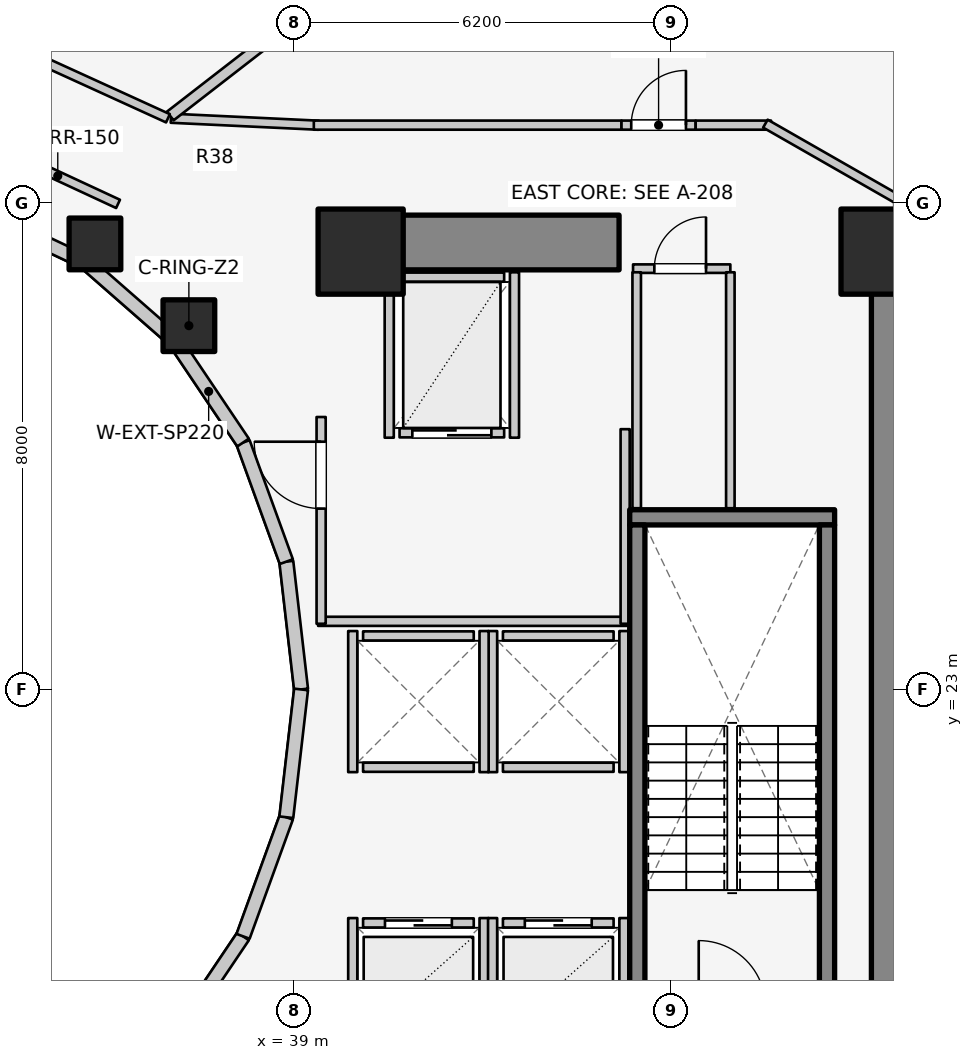
"""IFC4 building model, lengths in metres.
Left out: names, types, materials, properties, quantities, classifications, styles, units other than length and angle.
Written with IfcOpenShell. Run it as: python <this file> out.ifc"""

import sys

from ifc_helpers import new_model, si_unit, direction, frame, frame_2d, origin, origin_2d, place, context, subcontext, project, spatial, rectangle, extrude, element, fill, save


model = new_model("IFC4")
c1 = context("Model", 3, precision=1e-05, world=origin(), true_north=direction((0.0, 1.0)))
c2 = subcontext(c1, "Body", "Model", "MODEL_VIEW")
j1 = project(units=[si_unit("LENGTHUNIT", "METRE"), si_unit("PLANEANGLEUNIT", "RADIAN")], contexts=[c1])
p1 = place(None, origin())
s1 = spatial("IfcSite", under=j1, at=p1, CompositionType="ELEMENT")
p2 = place(p1, origin())
s2 = spatial("IfcBuilding", under=s1, at=p2, CompositionType="ELEMENT")
p3 = place(p2, frame((0.0, 0.0, 82.5)))
s3 = spatial("IfcBuildingStorey", under=s2, at=p3, CompositionType="ELEMENT", Elevation=82.5)
p4 = place(p3, frame((48.95, 17.05, 0.0), z_axis=(0.0, 0.0, 1.0), x_axis=(0.0, 1.0, 0.0)))
e1 = element("IfcWall", 1, at=p4, inside=s3, PredefinedType="SHEAR", context=c2, shape_type="SweptSolid", body=[
    extrude(rectangle(XDim=12.8, YDim=0.9, at=frame_2d((6.4, 0.0))), origin(), (0.0, 0.0, 1.0), 3.1),
])
p5 = place(p3, frame((39.85, 30.35, 0.0), z_axis=(0.0, 0.0, 1.0), x_axis=(1.0, 0.0, 0.0)))
e2 = element("IfcWall", 2, at=p5, inside=s3, PredefinedType="SHEAR", context=c2, shape_type="SweptSolid", body=[
    extrude(rectangle(XDim=4.5, YDim=0.9, at=frame_2d((2.25, 0.0))), origin(), (0.0, 0.0, 1.0), 3.1),
])
p6 = place(p3, frame((44.525, 25.83, 0.0), z_axis=(0.0, 0.0, 1.0), x_axis=(1.0, 0.0, 0.0)))
e3 = element("IfcWall", 3, at=p6, inside=s3, PredefinedType="SOLIDWALL", context=c2, shape_type="SweptSolid", body=[
    extrude(rectangle(XDim=3.37, YDim=0.25, at=frame_2d((1.685, 0.0))), origin(), (0.0, 0.0, 1.0), 3.1),
])
for number, where, z_axis, x_axis in (
    (4, (44.65, 17.895, 0.0), (0.0, 0.0, 1.0), (0.0, 1.0, 0.0)),
    (5, (47.77, 17.895, 0.0), (0.0, 0.0, 1.0), (0.0, 1.0, 0.0)),
):
    element("IfcWall", number, at=place(p3, frame(where, z_axis=z_axis, x_axis=x_axis)), inside=s3, PredefinedType="SOLIDWALL", context=c2, shape_type="SweptSolid", body=[
        extrude(rectangle(XDim=7.81, YDim=0.25, at=frame_2d((3.905, 0.0))), origin(), (0.0, 0.0, 1.0), 3.1),
    ])
for number, where, z_axis, x_axis in (
    (6, (48.7, 30.2, 0.0), (0.0, 0.0, 1.0), (1.0, 0.0, 0.0)),
    (7, (40.1, 30.2, 0.0), (0.0, 0.0, 1.0), (1.0, 0.0, 0.0)),
):
    element("IfcColumn", number, at=place(p3, frame(where, z_axis=z_axis, x_axis=x_axis)), inside=s3, PredefinedType="COLUMN", context=c2, shape_type="SweptSolid", body=[
        extrude(rectangle(XDim=1.4, YDim=1.4, at=origin_2d()), origin(), (0.0, 0.0, 1.0), 3.1),
    ])
for number, where, z_axis, x_axis in (
    (8, (37.275, 28.982, 0.0), (0.0, 0.0, 1.0), (1.0, 0.0, 0.0)),
    (9, (35.73, 30.327, 0.0), (0.0, 0.0, 1.0), (1.0, 0.0, 0.0)),
):
    element("IfcColumn", number, at=place(p3, frame(where, z_axis=z_axis, x_axis=x_axis)), inside=s3, PredefinedType="COLUMN", context=c2, shape_type="SweptSolid", body=[
        extrude(rectangle(XDim=0.85, YDim=0.85, at=origin_2d()), origin(), (0.0, 0.0, 1.0), 3.1),
    ])
p7 = place(p3, frame((39.12, 23.0, 0.0), z_axis=(0.0, 0.0, 1.0), x_axis=(-0.114711713601, 0.993398823617, 0.0)))
e10 = element("IfcWall", 10, at=p7, inside=s3, PredefinedType="STANDARD", context=c2, shape_type="SweptSolid", body=[
    extrude(rectangle(XDim=2.115, YDim=0.23, at=frame_2d((1.058, 0.0))), origin(), (0.0, 0.0, 1.0), 2.56),
])
p8 = place(p3, frame((38.877, 25.102, 0.0), z_axis=(0.0, 0.0, 1.0), x_axis=(-0.341423187295, 0.93990968033, 0.0)))
e11 = element("IfcWall", 11, at=p8, inside=s3, PredefinedType="STANDARD", context=c2, shape_type="SweptSolid", body=[
    extrude(rectangle(XDim=2.084, YDim=0.23, at=frame_2d((1.042, 0.0))), origin(), (0.0, 0.0, 1.0), 2.56),
])
p9 = place(p3, frame((38.166, 27.06, 0.0), z_axis=(0.0, 0.0, 1.0), x_axis=(-0.558197800898, 0.829707909492, 0.0)))
e12 = element("IfcWall", 12, at=p9, inside=s3, PredefinedType="STANDARD", context=c2, shape_type="SweptSolid", body=[
    extrude(rectangle(XDim=2.027, YDim=0.23, at=frame_2d((1.013, 0.0))), origin(), (0.0, 0.0, 1.0), 1.22),
])
p10 = place(p3, frame((37.035, 28.742, 0.0), z_axis=(0.0, 0.0, 1.0), x_axis=(-0.752576694707, 0.658504607869, 0.0)))
e13 = element("IfcWall", 13, at=p10, inside=s3, PredefinedType="STANDARD", context=c2, shape_type="SweptSolid", body=[
    extrude(rectangle(XDim=1.959, YDim=0.23, at=frame_2d((0.98, 0.0))), origin(), (0.0, 0.0, 1.0), 1.22),
])
p11 = place(p3, frame((35.56, 30.032, 0.0), z_axis=(0.0, 0.0, 1.0), x_axis=(-0.904179699603, 0.427152280606, 0.0)))
e14 = element("IfcWall", 14, at=p11, inside=s3, PredefinedType="STANDARD", context=c2, shape_type="SweptSolid", body=[
    extrude(rectangle(XDim=1.899, YDim=0.23, at=frame_2d((0.95, 0.0))), origin(), (0.0, 0.0, 1.0), 1.22),
])
p12 = place(p3, frame((37.035, 17.258, 0.0), z_axis=(0.0, 0.0, 1.0), x_axis=(0.558197800898, 0.829707909492, 0.0)))
e15 = element("IfcWall", 15, at=p12, inside=s3, PredefinedType="STANDARD", context=c2, shape_type="SweptSolid", body=[
    extrude(rectangle(XDim=2.027, YDim=0.23, at=frame_2d((1.013, 0.0))), origin(), (0.0, 0.0, 1.0), 1.22),
])
p13 = place(p3, frame((38.166, 18.94, 0.0), z_axis=(0.0, 0.0, 1.0), x_axis=(0.341423187295, 0.93990968033, 0.0)))
e16 = element("IfcWall", 16, at=p13, inside=s3, PredefinedType="STANDARD", context=c2, shape_type="SweptSolid", body=[
    extrude(rectangle(XDim=2.084, YDim=0.23, at=frame_2d((1.042, 0.0))), origin(), (0.0, 0.0, 1.0), 2.56),
])
p14 = place(p3, frame((38.877, 20.898, 0.0), z_axis=(0.0, 0.0, 1.0), x_axis=(0.114711713601, 0.993398823617, 0.0)))
e17 = element("IfcWall", 17, at=p14, inside=s3, PredefinedType="STANDARD", context=c2, shape_type="SweptSolid", body=[
    extrude(rectangle(XDim=2.115, YDim=0.23, at=frame_2d((1.058, 0.0))), origin(), (0.0, 0.0, 1.0), 2.56),
])
p15 = place(p3, frame((40.14, 19.16, 0.0), z_axis=(0.0, 0.0, 1.0), x_axis=(1.0, 0.0, 0.0)))
e18 = element("IfcWall", 18, at=p15, inside=s3, PredefinedType="SOLIDWALL", context=c2, shape_type="SweptSolid", body=[
    extrude(rectangle(XDim=1.82, YDim=0.15, at=frame_2d((0.91, 0.0))), origin(), (0.0, 0.0, 1.0), 2.12),
])
p16 = place(p15, frame((0.36, 0.0, 0.0)))
e19 = element("IfcOpeningElement", 19, at=p16, cuts=e18, PredefinedType="OPENING", context=c2, shape_type="SweptSolid", body=[
    extrude(rectangle(XDim=1.1, YDim=2.1, at=frame_2d((0.55, 1.05))), frame((0.0, 0.085, 0.0), z_axis=(0.0, -1.0, 0.0), x_axis=(1.0, 0.0, 0.0)), (0.0, 0.0, 1.0), 0.17),
])
p17 = place(p3, frame((39.97, 17.02, 0.0), z_axis=(0.0, 0.0, 1.0), x_axis=(0.0, 1.0, 0.0)))
e20 = element("IfcWall", 20, at=p17, inside=s3, PredefinedType="SOLIDWALL", context=c2, shape_type="SweptSolid", body=[
    extrude(rectangle(XDim=2.22, YDim=0.15, at=frame_2d((1.11, 0.0))), origin(), (0.0, 0.0, 1.0), 1.873),
])
p18 = place(p3, frame((42.13, 17.02, 0.0), z_axis=(0.0, 0.0, 1.0), x_axis=(0.0, 1.0, 0.0)))
e21 = element("IfcWall", 21, at=p18, inside=s3, PredefinedType="SOLIDWALL", context=c2, shape_type="SweptSolid", body=[
    extrude(rectangle(XDim=2.22, YDim=0.15, at=frame_2d((1.11, 0.0))), origin(), (0.0, 0.0, 1.0), 2.575),
])
p19 = place(p3, frame((42.44, 19.16, 0.0), z_axis=(0.0, 0.0, 1.0), x_axis=(1.0, 0.0, 0.0)))
e22 = element("IfcWall", 22, at=p19, inside=s3, PredefinedType="SOLIDWALL", context=c2, shape_type="SweptSolid", body=[
    extrude(rectangle(XDim=1.82, YDim=0.15, at=frame_2d((0.91, 0.0))), origin(), (0.0, 0.0, 1.0), 2.575),
])
p20 = place(p19, frame((0.36, 0.0, 0.0)))
e23 = element("IfcOpeningElement", 23, at=p20, cuts=e22, PredefinedType="OPENING", context=c2, shape_type="SweptSolid", body=[
    extrude(rectangle(XDim=1.1, YDim=2.1, at=frame_2d((0.55, 1.05))), frame((0.0, 0.085, 0.0), z_axis=(0.0, -1.0, 0.0), x_axis=(1.0, 0.0, 0.0)), (0.0, 0.0, 1.0), 0.17),
])
p21 = place(p3, frame((42.27, 17.02, 0.0), z_axis=(0.0, 0.0, 1.0), x_axis=(0.0, 1.0, 0.0)))
e24 = element("IfcWall", 24, at=p21, inside=s3, PredefinedType="SOLIDWALL", context=c2, shape_type="SweptSolid", body=[
    extrude(rectangle(XDim=2.22, YDim=0.15, at=frame_2d((1.11, 0.0))), origin(), (0.0, 0.0, 1.0), 2.575),
])
p22 = place(p3, frame((44.43, 17.02, 0.0), z_axis=(0.0, 0.0, 1.0), x_axis=(0.0, 1.0, 0.0)))
e25 = element("IfcWall", 25, at=p22, inside=s3, PredefinedType="SOLIDWALL", context=c2, shape_type="SweptSolid", body=[
    extrude(rectangle(XDim=2.22, YDim=0.15, at=frame_2d((1.11, 0.0))), origin(), (0.0, 0.0, 1.0), 2.12),
])
for number, where, z_axis, x_axis in (
    (26, (42.44, 21.72, 0.0), (0.0, 0.0, 1.0), (1.0, 0.0, 0.0)),
    (27, (42.44, 23.88, 0.0), (0.0, 0.0, 1.0), (1.0, 0.0, 0.0)),
):
    element("IfcWall", number, at=place(p3, frame(where, z_axis=z_axis, x_axis=x_axis)), inside=s3, PredefinedType="SOLIDWALL", context=c2, shape_type="SweptSolid", body=[
        extrude(rectangle(XDim=1.82, YDim=0.15, at=frame_2d((0.91, 0.0))), origin(), (0.0, 0.0, 1.0), 2.575),
    ])
for number, where, z_axis, x_axis in (
    (28, (42.27, 21.64, 0.0), (0.0, 0.0, 1.0), (0.0, 1.0, 0.0)),
    (29, (44.43, 21.64, 0.0), (0.0, 0.0, 1.0), (0.0, 1.0, 0.0)),
):
    element("IfcWall", number, at=place(p3, frame(where, z_axis=z_axis, x_axis=x_axis)), inside=s3, PredefinedType="SOLIDWALL", context=c2, shape_type="SweptSolid", body=[
        extrude(rectangle(XDim=2.32, YDim=0.15, at=frame_2d((1.16, 0.0))), origin(), (0.0, 0.0, 1.0), 2.575),
    ])
for number, where, z_axis, x_axis in (
    (30, (40.14, 21.72, 0.0), (0.0, 0.0, 1.0), (1.0, 0.0, 0.0)),
    (31, (40.14, 23.88, 0.0), (0.0, 0.0, 1.0), (1.0, 0.0, 0.0)),
):
    element("IfcWall", number, at=place(p3, frame(where, z_axis=z_axis, x_axis=x_axis)), inside=s3, PredefinedType="SOLIDWALL", context=c2, shape_type="SweptSolid", body=[
        extrude(rectangle(XDim=1.82, YDim=0.15, at=frame_2d((0.91, 0.0))), origin(), (0.0, 0.0, 1.0), 2.12),
    ])
p23 = place(p3, frame((39.97, 21.64, 0.0), z_axis=(0.0, 0.0, 1.0), x_axis=(0.0, 1.0, 0.0)))
e32 = element("IfcWall", 32, at=p23, inside=s3, PredefinedType="SOLIDWALL", context=c2, shape_type="SweptSolid", body=[
    extrude(rectangle(XDim=2.32, YDim=0.15, at=frame_2d((1.16, 0.0))), origin(), (0.0, 0.0, 1.0), 2.12),
])
p24 = place(p3, frame((42.13, 21.64, 0.0), z_axis=(0.0, 0.0, 1.0), x_axis=(0.0, 1.0, 0.0)))
e33 = element("IfcWall", 33, at=p24, inside=s3, PredefinedType="SOLIDWALL", context=c2, shape_type="SweptSolid", body=[
    extrude(rectangle(XDim=2.32, YDim=0.15, at=frame_2d((1.16, 0.0))), origin(), (0.0, 0.0, 1.0), 2.575),
])
p25 = place(p3, frame((40.74, 27.22, 0.0), z_axis=(0.0, 0.0, 1.0), x_axis=(1.0, 0.0, 0.0)))
e34 = element("IfcWall", 34, at=p25, inside=s3, PredefinedType="SOLIDWALL", context=c2, shape_type="SweptSolid", body=[
    extrude(rectangle(XDim=1.72, YDim=0.15, at=frame_2d((0.86, 0.0))), origin(), (0.0, 0.0, 1.0), 2.575),
])
p26 = place(p25, frame((0.21, 0.0, 0.0)))
e35 = element("IfcOpeningElement", 35, at=p26, cuts=e34, PredefinedType="OPENING", context=c2, shape_type="SweptSolid", body=[
    extrude(rectangle(XDim=1.3, YDim=2.1, at=frame_2d((0.65, 1.05))), frame((0.0, 0.085, 0.0), z_axis=(0.0, -1.0, 0.0), x_axis=(1.0, 0.0, 0.0)), (0.0, 0.0, 1.0), 0.17),
])
p27 = place(p3, frame((40.74, 29.78, 0.0), z_axis=(0.0, 0.0, 1.0), x_axis=(1.0, 0.0, 0.0)))
e36 = element("IfcWall", 36, at=p27, inside=s3, PredefinedType="SOLIDWALL", context=c2, shape_type="SweptSolid", body=[
    extrude(rectangle(XDim=1.72, YDim=0.15, at=frame_2d((0.86, 0.0))), origin(), (0.0, 0.0, 1.0), 2.575),
])
for number, where, z_axis, x_axis in (
    (37, (40.57, 27.14, 0.0), (0.0, 0.0, 1.0), (0.0, 1.0, 0.0)),
    (38, (42.63, 27.14, 0.0), (0.0, 0.0, 1.0), (0.0, 1.0, 0.0)),
):
    element("IfcWall", number, at=place(p3, frame(where, z_axis=z_axis, x_axis=x_axis)), inside=s3, PredefinedType="SOLIDWALL", context=c2, shape_type="SweptSolid", body=[
        extrude(rectangle(XDim=2.72, YDim=0.15, at=frame_2d((1.36, 0.0))), origin(), (0.0, 0.0, 1.0), 2.575),
    ])
p28 = place(p3, frame((39.4, 24.12, 0.0), z_axis=(0.0, 0.0, 1.0), x_axis=(1.0, 0.0, 0.0)))
e39 = element("IfcWall", 39, at=p28, inside=s3, PredefinedType="PARTITIONING", context=c2, shape_type="SweptSolid", body=[
    extrude(rectangle(XDim=5.08, YDim=0.15, at=frame_2d((2.54, 0.0))), origin(), (0.0, 0.0, 1.0), 2.12),
])
p29 = place(p3, frame((44.45, 24.08, 0.0), z_axis=(0.0, 0.0, 1.0), x_axis=(0.0, 1.0, 0.0)))
e40 = element("IfcWall", 40, at=p29, inside=s3, PredefinedType="PARTITIONING", context=c2, shape_type="SweptSolid", body=[
    extrude(rectangle(XDim=3.2, YDim=0.15, at=frame_2d((1.6, 0.0))), origin(), (0.0, 0.0, 1.0), 2.575),
])
p30 = place(p3, frame((39.45, 24.08, 0.0), z_axis=(0.0, 0.0, 1.0), x_axis=(0.0, 1.0, 0.0)))
e41 = element("IfcWall", 41, at=p30, inside=s3, PredefinedType="PARTITIONING", context=c2, shape_type="SweptSolid", body=[
    extrude(rectangle(XDim=3.4, YDim=0.15, at=frame_2d((1.7, 0.0))), origin(), (0.0, 0.0, 1.0), 2.575),
])
p31 = place(p30, frame((1.894, 0.0, 0.0)))
e42 = element("IfcOpeningElement", 42, at=p31, cuts=e41, PredefinedType="OPENING", context=c2, shape_type="SweptSolid", body=[
    extrude(rectangle(XDim=1.1, YDim=2.1, at=frame_2d((0.55, 1.05))), frame((0.0, 0.085, 0.0), z_axis=(0.0, -1.0, 0.0), x_axis=(1.0, 0.0, 0.0)), (0.0, 0.0, 1.0), 0.17),
])
p32 = place(p3, frame((44.58, 29.92, 0.0), z_axis=(0.0, 0.0, 1.0), x_axis=(1.0, 0.0, 0.0)))
e43 = element("IfcWall", 43, at=p32, inside=s3, PredefinedType="PLUMBINGWALL", context=c2, shape_type="SweptSolid", body=[
    extrude(rectangle(XDim=1.6, YDim=0.14, at=frame_2d((0.8, 0.0))), origin(), (0.0, 0.0, 1.0), 2.575),
])
p33 = place(p32, frame((0.35, 0.0, 0.0)))
e44 = element("IfcOpeningElement", 44, at=p33, cuts=e43, PredefinedType="OPENING", context=c2, shape_type="SweptSolid", body=[
    extrude(rectangle(XDim=0.85, YDim=2.05, at=frame_2d((0.425, 1.025))), frame((0.0, 0.08, 0.0), z_axis=(0.0, -1.0, 0.0), x_axis=(1.0, 0.0, 0.0)), (0.0, 0.0, 1.0), 0.16),
])
for number, where, z_axis, x_axis in (
    (45, (44.64, 25.98, 0.0), (0.0, 0.0, 1.0), (0.0, 1.0, 0.0)),
    (46, (46.18, 25.98, 0.0), (0.0, 0.0, 1.0), (0.0, 1.0, 0.0)),
):
    element("IfcWall", number, at=place(p3, frame(where, z_axis=z_axis, x_axis=x_axis)), inside=s3, PredefinedType="PLUMBINGWALL", context=c2, shape_type="SweptSolid", body=[
        extrude(rectangle(XDim=3.88, YDim=0.14, at=frame_2d((1.94, 0.0))), origin(), (0.0, 0.0, 1.0), 2.575),
    ])
p34 = place(p3, frame((36.11, 30.985, 0.0), z_axis=(0.0, 0.0, 1.0), x_axis=(-0.906943449489, 0.421252393975, 0.0)))
e47 = element("IfcWall", 47, at=p34, inside=s3, PredefinedType="PARTITIONING", context=c2, shape_type="SweptSolid", body=[
    extrude(rectangle(XDim=2.186, YDim=0.15, at=frame_2d((1.093, 0.0))), origin(), (0.0, 0.0, 1.0), 1.22),
])
p35 = place(p3, frame((36.98, 32.394, 0.0), z_axis=(0.0, 0.0, 1.0), x_axis=(0.998877427952, -0.047369651964, 0.0)))
e48 = element("IfcWall", 48, at=p35, inside=s3, PredefinedType="PARTITIONING", context=c2, shape_type="SweptSolid", body=[
    extrude(rectangle(XDim=2.433, YDim=0.15, at=frame_2d((1.216, 0.0))), origin(), (0.0, 0.0, 1.0), 1.22),
])
p36 = place(p3, frame((39.33, 32.28, 0.0), z_axis=(0.0, 0.0, 1.0), x_axis=(1.0, 0.0, 0.0)))
e49 = element("IfcWall", 49, at=p36, inside=s3, PredefinedType="PARTITIONING", context=c2, shape_type="SweptSolid", body=[
    extrude(rectangle(XDim=5.06, YDim=0.15, at=frame_2d((2.53, 0.0))), origin(), (0.0, 0.0, 1.0), 1.22),
])
p37 = place(p3, frame((44.39, 32.28, 0.0), z_axis=(0.0, 0.0, 1.0), x_axis=(1.0, 0.0, 0.0)))
e50 = element("IfcWall", 50, at=p37, inside=s3, PredefinedType="PARTITIONING", context=c2, shape_type="SweptSolid", body=[
    extrude(rectangle(XDim=1.22, YDim=0.15, at=frame_2d((0.61, 0.0))), origin(), (0.0, 0.0, 1.0), 2.575),
])
p38 = place(p37, frame((0.16, 0.0, 0.0)))
e51 = element("IfcOpeningElement", 51, at=p38, cuts=e50, PredefinedType="OPENING", context=c2, shape_type="SweptSolid", body=[
    extrude(rectangle(XDim=0.9, YDim=2.1, at=frame_2d((0.45, 1.05))), frame((0.0, 0.085, 0.0), z_axis=(0.0, -1.0, 0.0), x_axis=(1.0, 0.0, 0.0)), (0.0, 0.0, 1.0), 0.17),
])
p39 = place(p3, frame((45.61, 32.28, 0.0), z_axis=(0.0, 0.0, 1.0), x_axis=(1.0, 0.0, 0.0)))
e52 = element("IfcWall", 52, at=p39, inside=s3, PredefinedType="PARTITIONING", context=c2, shape_type="SweptSolid", body=[
    extrude(rectangle(XDim=1.24, YDim=0.15, at=frame_2d((0.62, 0.0))), origin(), (0.0, 0.0, 1.0), 2.575),
])
p40 = place(p3, frame((46.757, 32.305, 0.0), z_axis=(0.0, 0.0, 1.0), x_axis=(0.867991349648, -0.496579315857, 0.0)))
e53 = element("IfcWall", 53, at=p40, inside=s3, PredefinedType="PARTITIONING", context=c2, shape_type="SweptSolid", body=[
    extrude(rectangle(XDim=2.567, YDim=0.15, at=frame_2d((1.283, 0.0))), origin(), (0.0, 0.0, 1.0), 1.22),
])
p41 = place(p3, frame((36.969, 32.43, 0.0), z_axis=(0.0, 0.0, 1.0), x_axis=(0.790421780952, 0.612562983045, 0.0)))
e54 = element("IfcWall", 54, at=p41, inside=s3, PredefinedType="PARTITIONING", context=c2, shape_type="SweptSolid", body=[
    extrude(rectangle(XDim=9.662, YDim=0.18, at=frame_2d((4.831, 0.0))), origin(), (0.0, 0.0, 1.0), 1.22),
])
p42 = place(p3, frame((36.931, 32.393, 0.0), z_axis=(0.0, 0.0, 1.0), x_axis=(-0.909747571199, 0.415161843982, 0.0)))
e55 = element("IfcWall", 55, at=p42, inside=s3, PredefinedType="PARTITIONING", context=c2, shape_type="SweptSolid", body=[
    extrude(rectangle(XDim=2.625, YDim=0.15, at=frame_2d((1.312, 0.0))), origin(), (0.0, 0.0, 1.0), 1.22),
])
p43 = place(p16, origin())
e56 = element("IfcDoor", 56, at=p43, inside=s3, OperationType="DOUBLE_DOOR_SLIDING", PredefinedType="DOOR", context=c2, shape_type="SweptSolid", body=[
    extrude(rectangle(XDim=1.1, YDim=2.1, at=frame_2d((0.55, 1.05))), frame((0.0, 0.025, 0.0), z_axis=(0.0, -1.0, 0.0), x_axis=(1.0, 0.0, 0.0)), (0.0, 0.0, 1.0), 0.05),
])
fill(e19, e56)
p44 = place(p20, origin())
e57 = element("IfcDoor", 57, at=p44, inside=s3, OperationType="DOUBLE_DOOR_SLIDING", PredefinedType="DOOR", context=c2, shape_type="SweptSolid", body=[
    extrude(rectangle(XDim=1.1, YDim=2.1, at=frame_2d((0.55, 1.05))), frame((0.0, 0.025, 0.0), z_axis=(0.0, -1.0, 0.0), x_axis=(1.0, 0.0, 0.0)), (0.0, 0.0, 1.0), 0.05),
])
fill(e23, e57)
p45 = place(p26, origin())
e58 = element("IfcDoor", 58, at=p45, inside=s3, OperationType="DOUBLE_DOOR_SLIDING", PredefinedType="DOOR", context=c2, shape_type="SweptSolid", body=[
    extrude(rectangle(XDim=1.3, YDim=2.1, at=frame_2d((0.65, 1.05))), frame((0.0, 0.025, 0.0), z_axis=(0.0, -1.0, 0.0), x_axis=(1.0, 0.0, 0.0)), (0.0, 0.0, 1.0), 0.05),
])
fill(e35, e58)
p46 = place(p31, origin())
e59 = element("IfcDoor", 59, at=p46, inside=s3, OperationType="SINGLE_SWING_RIGHT", PredefinedType="DOOR", context=c2, shape_type="SweptSolid", body=[
    extrude(rectangle(XDim=1.1, YDim=2.1, at=frame_2d((0.55, 1.05))), frame((0.0, 0.025, 0.0), z_axis=(0.0, -1.0, 0.0), x_axis=(1.0, 0.0, 0.0)), (0.0, 0.0, 1.0), 0.05),
])
fill(e42, e59)
p47 = place(p33, origin())
e60 = element("IfcDoor", 60, at=p47, inside=s3, OperationType="SINGLE_SWING_RIGHT", PredefinedType="DOOR", context=c2, shape_type="SweptSolid", body=[
    extrude(rectangle(XDim=0.85, YDim=2.05, at=frame_2d((0.425, 1.025))), frame((0.0, 0.025, 0.0), z_axis=(0.0, -1.0, 0.0), x_axis=(1.0, 0.0, 0.0)), (0.0, 0.0, 1.0), 0.05),
])
fill(e44, e60)
p48 = place(p38, origin())
e61 = element("IfcDoor", 61, at=p48, inside=s3, OperationType="SINGLE_SWING_RIGHT", PredefinedType="DOOR", context=c2, shape_type="SweptSolid", body=[
    extrude(rectangle(XDim=0.9, YDim=2.1, at=frame_2d((0.45, 1.05))), frame((0.0, 0.025, 0.0), z_axis=(0.0, -1.0, 0.0), x_axis=(1.0, 0.0, 0.0)), (0.0, 0.0, 1.0), 0.05),
])
fill(e51, e61)
save(model, sys.argv[1])
